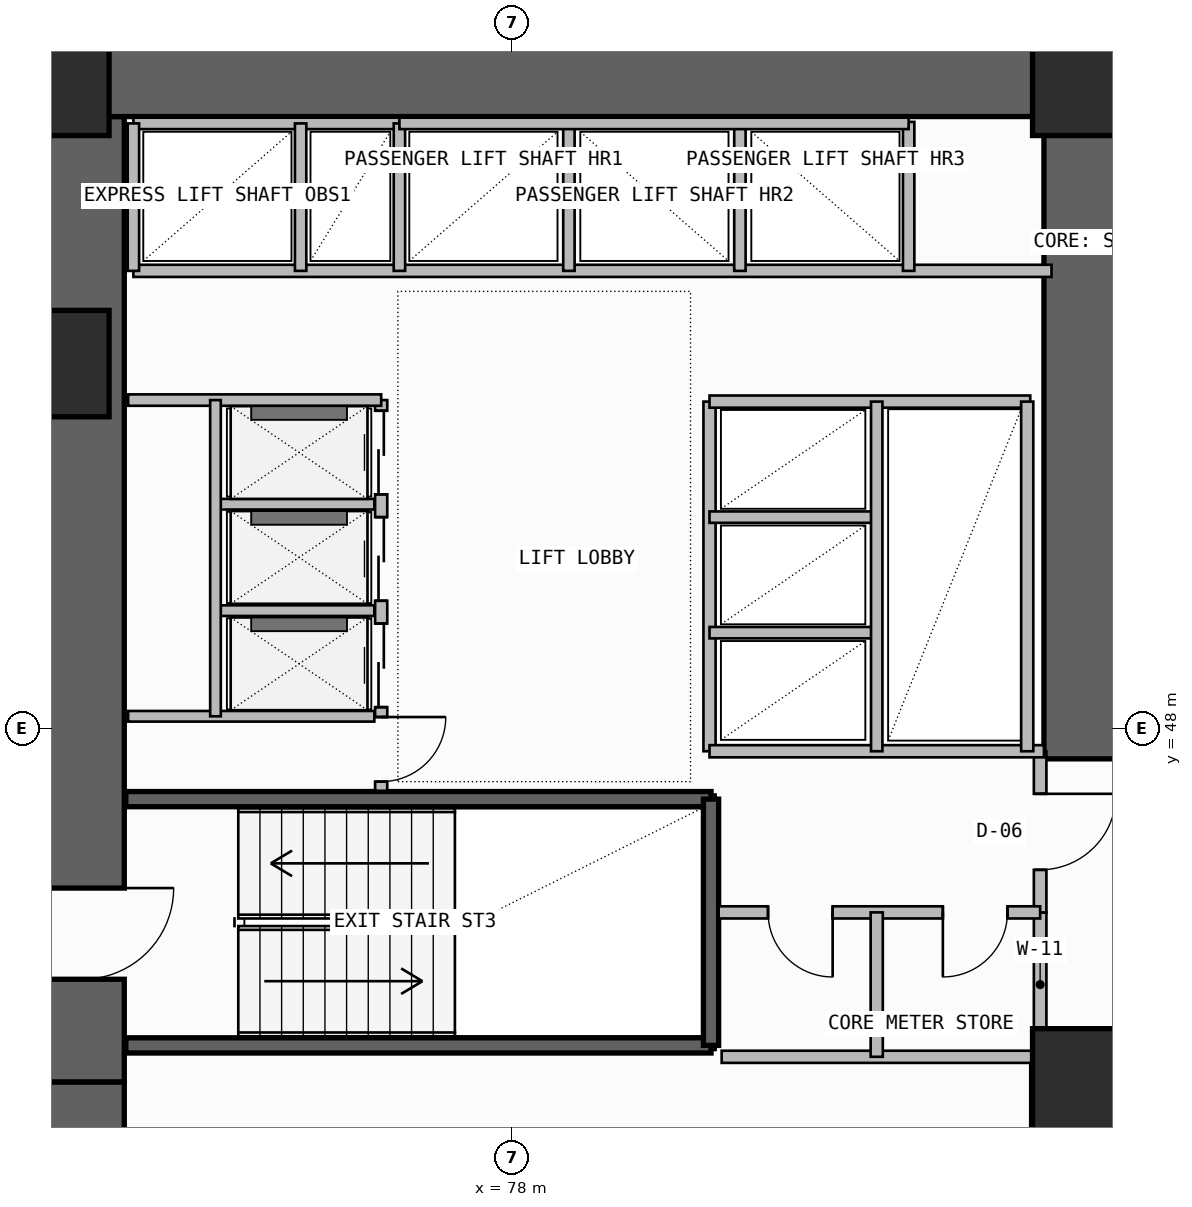
"""IFC4 building model, lengths in metres.
Left out: names, types, materials, properties, quantities, classifications, styles, units other than length and angle.
Written with IfcOpenShell. Run it as: python <this file> out.ifc"""

import sys

from ifc_helpers import new_model, si_unit, direction, frame, frame_2d, origin, origin_2d, place, context, subcontext, project, spatial, rectangle, extrude, element, fill, save


model = new_model("IFC4")
c1 = context("Model", 3, precision=1e-05, world=origin(), true_north=direction((0.0, 1.0)))
c2 = subcontext(c1, "Body", "Model", "MODEL_VIEW")
j1 = project(units=[si_unit("LENGTHUNIT", "METRE"), si_unit("PLANEANGLEUNIT", "RADIAN")], contexts=[c1])
p1 = place(None, origin())
s1 = spatial("IfcSite", under=j1, at=p1, CompositionType="ELEMENT")
p2 = place(p1, origin())
s2 = spatial("IfcBuilding", under=s1, at=p2, CompositionType="ELEMENT")
p3 = place(p2, frame((0.0, 0.0, 66.9)))
s3 = spatial("IfcBuildingStorey", under=s2, at=p3, CompositionType="ELEMENT", Elevation=66.9)
p4 = place(p3, frame((72.35, 35.5, -0.26), z_axis=(0.0, 0.0, 1.0), x_axis=(0.0, 1.0, 0.0)))
e1 = element("IfcWall", 1, at=p4, inside=s3, PredefinedType="SHEAR", context=c2, shape_type="SweptSolid", body=[
    extrude(rectangle(XDim=7.85, YDim=1.1, at=frame_2d((3.925, 0.0))), origin(), (0.0, 0.0, 1.0), 3.6),
])
p5 = place(p4, frame((1.45, 0.0, 0.26)))
e2 = element("IfcOpeningElement", 2, at=p5, cuts=e1, PredefinedType="OPENING", context=c2, shape_type="SweptSolid", body=[
    extrude(rectangle(XDim=1.2, YDim=2.2, at=frame_2d((0.6, 1.1))), frame((0.0, 0.56, 0.0), z_axis=(0.0, -1.0, 0.0), x_axis=(1.0, 0.0, 0.0)), (0.0, 0.0, 1.0), 1.12),
])
p6 = place(p3, frame((72.35, 43.35, -0.26), z_axis=(0.0, 0.0, 1.0), x_axis=(0.0, 1.0, 0.0)))
e3 = element("IfcWall", 3, at=p6, inside=s3, PredefinedType="SHEAR", context=c2, shape_type="SweptSolid", body=[
    extrude(rectangle(XDim=12.7, YDim=1.1, at=frame_2d((6.35, 0.0))), origin(), (0.0, 0.0, 1.0), 3.6),
])
p7 = place(p6, frame((1.35, 0.0, 0.26)))
e4 = element("IfcOpeningElement", 4, at=p7, cuts=e3, PredefinedType="OPENING", context=c2, shape_type="SweptSolid", body=[
    extrude(rectangle(XDim=1.2, YDim=2.2, at=frame_2d((0.6, 1.1))), frame((0.0, 0.56, 0.0), z_axis=(0.0, -1.0, 0.0), x_axis=(1.0, 0.0, 0.0)), (0.0, 0.0, 1.0), 1.12),
])
p8 = place(p3, frame((71.8, 56.6, -0.26), z_axis=(0.0, 0.0, 1.0), x_axis=(1.0, 0.0, 0.0)))
e5 = element("IfcWall", 5, at=p8, inside=s3, PredefinedType="SHEAR", context=c2, shape_type="SweptSolid", body=[
    extrude(rectangle(XDim=14.3, YDim=1.1, at=frame_2d((7.15, 0.0))), origin(), (0.0, 0.0, 1.0), 3.6),
])
p9 = place(p3, frame((85.55, 47.6, -0.26), z_axis=(0.0, 0.0, 1.0), x_axis=(0.0, 1.0, 0.0)))
e6 = element("IfcWall", 6, at=p9, inside=s3, PredefinedType="SHEAR", context=c2, shape_type="SweptSolid", body=[
    extrude(rectangle(XDim=8.45, YDim=1.1, at=frame_2d((4.225, 0.0))), origin(), (0.0, 0.0, 1.0), 3.6),
])
for number, where, z_axis, x_axis in (
    (7, (85.55, 43.35, 0.0), (0.0, 0.0, 1.0), (1.0, 0.0, 0.0)),
    (8, (72.0, 52.8, 0.0), (0.0, 0.0, 1.0), (1.0, 0.0, 0.0)),
    (9, (72.0, 56.5, 0.0), (0.0, 0.0, 1.0), (1.0, 0.0, 0.0)),
    (10, (85.55, 56.5, 0.0), (0.0, 0.0, 1.0), (1.0, 0.0, 0.0)),
):
    element("IfcColumn", number, at=place(p3, frame(where, z_axis=z_axis, x_axis=x_axis)), inside=s3, PredefinedType="COLUMN", context=c2, shape_type="SweptSolid", body=[
        extrude(rectangle(XDim=1.4, YDim=1.4, at=origin_2d()), origin(), (0.0, 0.0, 1.0), 3.6),
    ])
p10 = place(p3, frame((84.92, 38.85, 0.0), z_axis=(0.0, 0.0, 1.0), x_axis=(0.0, 1.0, 0.0)))
e11 = element("IfcWall", 11, at=p10, inside=s3, PredefinedType="SOLIDWALL", context=c2, shape_type="SweptSolid", body=[
    extrude(rectangle(XDim=4.83, YDim=0.2, at=frame_2d((2.415, 0.0))), origin(), (0.0, 0.0, 1.0), 3.34),
])
p11 = place(p10, frame((1.25, 0.0, 0.0)))
e12 = element("IfcOpeningElement", 12, at=p11, cuts=e11, PredefinedType="OPENING", context=c2, shape_type="SweptSolid", body=[
    extrude(rectangle(XDim=1.1, YDim=2.2, at=frame_2d((0.55, 1.1))), frame((0.0, 0.11, 0.0), z_axis=(0.0, -1.0, 0.0), x_axis=(1.0, 0.0, 0.0)), (0.0, 0.0, 1.0), 0.22),
])
for number, where, z_axis, x_axis in (
    (13, (72.92, 43.83, -0.26), (0.0, 0.0, 1.0), (1.0, 0.0, 0.0)),
    (14, (72.92, 47.07, -0.26), (0.0, 0.0, 1.0), (1.0, 0.0, 0.0)),
):
    element("IfcWall", number, at=place(p3, frame(where, z_axis=z_axis, x_axis=x_axis)), inside=s3, PredefinedType="SOLIDWALL", context=c2, shape_type="SweptSolid", body=[
        extrude(rectangle(XDim=7.7, YDim=0.2, at=frame_2d((3.85, 0.0))), origin(), (0.0, 0.0, 1.0), 3.6),
    ])
p12 = place(p3, frame((80.62, 43.83, -0.26), z_axis=(0.0, 0.0, 1.0), x_axis=(0.0, 1.0, 0.0)))
e15 = element("IfcWall", 15, at=p12, inside=s3, PredefinedType="SOLIDWALL", context=c2, shape_type="SweptSolid", body=[
    extrude(rectangle(XDim=3.24, YDim=0.2, at=frame_2d((1.62, 0.0))), origin(), (0.0, 0.0, 1.0), 3.6),
])
p13 = place(p3, frame((84.95, 43.68, 0.0), z_axis=(0.0, 0.0, 1.0), x_axis=(0.0, 1.0, 0.0)))
e16 = element("IfcWall", 16, at=p13, inside=s3, PredefinedType="PLUMBINGWALL", context=c2, shape_type="SweptSolid", body=[
    extrude(rectangle(XDim=1.9, YDim=0.165, at=frame_2d((0.95, 0.0))), origin(), (0.0, 0.0, 1.0), 3.34),
])
p14 = place(p3, frame((84.95, 45.58, 0.0), z_axis=(0.0, 0.0, 1.0), x_axis=(0.0, 1.0, 0.0)))
e17 = element("IfcWall", 17, at=p14, inside=s3, PredefinedType="PARTITIONING", context=c2, shape_type="SweptSolid", body=[
    extrude(rectangle(XDim=2.12, YDim=0.165, at=frame_2d((1.06, 0.0))), origin(), (0.0, 0.0, 1.0), 3.34),
])
p15 = place(p14, frame((0.56, 0.0, 0.0)))
e18 = element("IfcOpeningElement", 18, at=p15, cuts=e17, PredefinedType="OPENING", context=c2, shape_type="SweptSolid", body=[
    extrude(rectangle(XDim=1.0, YDim=2.2, at=frame_2d((0.5, 1.1))), frame((0.0, 0.093, 0.0), z_axis=(0.0, -1.0, 0.0), x_axis=(1.0, 0.0, 0.0)), (0.0, 0.0, 1.0), 0.185),
])
p16 = place(p3, frame((80.72, 45.58, 0.0), z_axis=(0.0, 0.0, 1.0), x_axis=(1.0, 0.0, 0.0)))
e19 = element("IfcWall", 19, at=p16, inside=s3, PredefinedType="PLUMBINGWALL", context=c2, shape_type="SweptSolid", body=[
    extrude(rectangle(XDim=4.23, YDim=0.16, at=frame_2d((2.115, 0.0))), origin(), (0.0, 0.0, 1.0), 3.34),
])
p17 = place(p16, frame((0.65, 0.0, 0.0)))
e20 = element("IfcOpeningElement", 20, at=p17, cuts=e19, PredefinedType="OPENING", context=c2, shape_type="SweptSolid", body=[
    extrude(rectangle(XDim=0.85, YDim=2.05, at=frame_2d((0.425, 1.025))), frame((0.0, 0.09, 0.0), z_axis=(0.0, -1.0, 0.0), x_axis=(1.0, 0.0, 0.0)), (0.0, 0.0, 1.0), 0.18),
])
p18 = place(p16, frame((2.95, 0.0, 0.0)))
e21 = element("IfcOpeningElement", 21, at=p18, cuts=e19, PredefinedType="OPENING", context=c2, shape_type="SweptSolid", body=[
    extrude(rectangle(XDim=0.85, YDim=2.05, at=frame_2d((0.425, 1.025))), frame((0.0, 0.09, 0.0), z_axis=(0.0, -1.0, 0.0), x_axis=(1.0, 0.0, 0.0)), (0.0, 0.0, 1.0), 0.18),
])
p19 = place(p3, frame((80.76, 43.68, 0.0), z_axis=(0.0, 0.0, 1.0), x_axis=(1.0, 0.0, 0.0)))
e22 = element("IfcWall", 22, at=p19, inside=s3, PredefinedType="PLUMBINGWALL", context=c2, shape_type="SweptSolid", body=[
    extrude(rectangle(XDim=4.19, YDim=0.16, at=frame_2d((2.095, 0.0))), origin(), (0.0, 0.0, 1.0), 3.34),
])
p20 = place(p3, frame((82.8, 43.68, 0.0), z_axis=(0.0, 0.0, 1.0), x_axis=(0.0, 1.0, 0.0)))
e23 = element("IfcWall", 23, at=p20, inside=s3, PredefinedType="PLUMBINGWALL", context=c2, shape_type="SweptSolid", body=[
    extrude(rectangle(XDim=1.9, YDim=0.16, at=frame_2d((0.95, 0.0))), origin(), (0.0, 0.0, 1.0), 3.34),
])
p21 = place(p3, frame((76.28, 47.18, 0.0), z_axis=(0.0, 0.0, 1.0), x_axis=(0.0, 1.0, 0.0)))
e24 = element("IfcWall", 24, at=p21, inside=s3, PredefinedType="SOLIDWALL", context=c2, shape_type="SweptSolid", body=[
    extrude(rectangle(XDim=5.14, YDim=0.16, at=frame_2d((2.57, 0.0))), origin(), (0.0, 0.0, 1.0), 3.34),
])
p22 = place(p21, frame((1.1, 0.0, 0.0)))
e25 = element("IfcOpeningElement", 25, at=p22, cuts=e24, PredefinedType="OPENING", context=c2, shape_type="SweptSolid", body=[
    extrude(rectangle(XDim=1.1, YDim=2.25, at=frame_2d((0.55, 1.125))), frame((0.0, 0.09, 0.0), z_axis=(0.0, -1.0, 0.0), x_axis=(1.0, 0.0, 0.0)), (0.0, 0.0, 1.0), 0.18),
])
p23 = place(p21, frame((2.5, 0.0, 0.0)))
e26 = element("IfcOpeningElement", 26, at=p23, cuts=e24, PredefinedType="OPENING", context=c2, shape_type="SweptSolid", body=[
    extrude(rectangle(XDim=1.1, YDim=2.25, at=frame_2d((0.55, 1.125))), frame((0.0, 0.09, 0.0), z_axis=(0.0, -1.0, 0.0), x_axis=(1.0, 0.0, 0.0)), (0.0, 0.0, 1.0), 0.18),
])
p24 = place(p21, frame((3.9, 0.0, 0.0)))
e27 = element("IfcOpeningElement", 27, at=p24, cuts=e24, PredefinedType="OPENING", context=c2, shape_type="SweptSolid", body=[
    extrude(rectangle(XDim=1.1, YDim=2.25, at=frame_2d((0.55, 1.125))), frame((0.0, 0.09, 0.0), z_axis=(0.0, -1.0, 0.0), x_axis=(1.0, 0.0, 0.0)), (0.0, 0.0, 1.0), 0.18),
])
p25 = place(p21, frame((0.12, 0.0, 0.0)))
e28 = element("IfcOpeningElement", 28, at=p25, cuts=e24, PredefinedType="OPENING", context=c2, shape_type="SweptSolid", body=[
    extrude(rectangle(XDim=0.85, YDim=2.05, at=frame_2d((0.425, 1.025))), frame((0.0, 0.09, 0.0), z_axis=(0.0, -1.0, 0.0), x_axis=(1.0, 0.0, 0.0)), (0.0, 0.0, 1.0), 0.18),
])
p26 = place(p3, frame((72.95, 52.32, 0.0), z_axis=(0.0, 0.0, 1.0), x_axis=(1.0, 0.0, 0.0)))
e29 = element("IfcWall", 29, at=p26, inside=s3, PredefinedType="SOLIDWALL", context=c2, shape_type="SweptSolid", body=[
    extrude(rectangle(XDim=3.33, YDim=0.15, at=frame_2d((1.665, 0.0))), origin(), (0.0, 0.0, 1.0), 3.34),
])
p27 = place(p3, frame((72.95, 48.16, 0.0), z_axis=(0.0, 0.0, 1.0), x_axis=(1.0, 0.0, 0.0)))
e30 = element("IfcWall", 30, at=p27, inside=s3, PredefinedType="PLUMBINGWALL", context=c2, shape_type="SweptSolid", body=[
    extrude(rectangle(XDim=3.24, YDim=0.14, at=frame_2d((1.62, 0.0))), origin(), (0.0, 0.0, 1.0), 3.34),
])
for number, where, z_axis, x_axis in (
    (31, (74.15, 49.55, 0.0), (0.0, 0.0, 1.0), (1.0, 0.0, 0.0)),
    (32, (74.15, 50.95, 0.0), (0.0, 0.0, 1.0), (1.0, 0.0, 0.0)),
):
    element("IfcWall", number, at=place(p3, frame(where, z_axis=z_axis, x_axis=x_axis)), inside=s3, PredefinedType="PLUMBINGWALL", context=c2, shape_type="SweptSolid", body=[
        extrude(rectangle(XDim=2.04, YDim=0.14, at=frame_2d((1.02, 0.0))), origin(), (0.0, 0.0, 1.0), 3.34),
    ])
p28 = place(p3, frame((74.1, 48.16, 0.0), z_axis=(0.0, 0.0, 1.0), x_axis=(0.0, 1.0, 0.0)))
e33 = element("IfcWall", 33, at=p28, inside=s3, PredefinedType="PLUMBINGWALL", context=c2, shape_type="SweptSolid", body=[
    extrude(rectangle(XDim=4.16, YDim=0.14, at=frame_2d((2.08, 0.0))), origin(), (0.0, 0.0, 1.0), 3.34),
])
p29 = place(p3, frame((80.6, 47.7, 0.0), z_axis=(0.0, 0.0, 1.0), x_axis=(0.0, 1.0, 0.0)))
e34 = element("IfcWall", 34, at=p29, inside=s3, PredefinedType="SOLIDWALL", context=c2, shape_type="SweptSolid", body=[
    extrude(rectangle(XDim=4.6, YDim=0.16, at=frame_2d((2.3, 0.0))), origin(), (0.0, 0.0, 1.0), 3.34),
])
p30 = place(p3, frame((80.6, 47.7, 0.0), z_axis=(0.0, 0.0, 1.0), x_axis=(1.0, 0.0, 0.0)))
e35 = element("IfcWall", 35, at=p30, inside=s3, PredefinedType="SOLIDWALL", context=c2, shape_type="SweptSolid", body=[
    extrude(rectangle(XDim=4.4, YDim=0.16, at=frame_2d((2.2, 0.0))), origin(), (0.0, 0.0, 1.0), 3.34),
])
p31 = place(p3, frame((80.6, 52.3, 0.0), z_axis=(0.0, 0.0, 1.0), x_axis=(1.0, 0.0, 0.0)))
e36 = element("IfcWall", 36, at=p31, inside=s3, PredefinedType="SOLIDWALL", context=c2, shape_type="SweptSolid", body=[
    extrude(rectangle(XDim=4.22, YDim=0.16, at=frame_2d((2.11, 0.0))), origin(), (0.0, 0.0, 1.0), 3.34),
])
for number, where, z_axis, x_axis in (
    (37, (80.6, 49.26, 0.0), (0.0, 0.0, 1.0), (1.0, 0.0, 0.0)),
    (38, (80.6, 50.78, 0.0), (0.0, 0.0, 1.0), (1.0, 0.0, 0.0)),
):
    element("IfcWall", number, at=place(p3, frame(where, z_axis=z_axis, x_axis=x_axis)), inside=s3, PredefinedType="PLUMBINGWALL", context=c2, shape_type="SweptSolid", body=[
        extrude(rectangle(XDim=2.2, YDim=0.15, at=frame_2d((1.1, 0.0))), origin(), (0.0, 0.0, 1.0), 3.34),
    ])
p32 = place(p3, frame((82.8, 47.7, 0.0), z_axis=(0.0, 0.0, 1.0), x_axis=(0.0, 1.0, 0.0)))
e39 = element("IfcWall", 39, at=p32, inside=s3, PredefinedType="PLUMBINGWALL", context=c2, shape_type="SweptSolid", body=[
    extrude(rectangle(XDim=4.6, YDim=0.15, at=frame_2d((2.3, 0.0))), origin(), (0.0, 0.0, 1.0), 3.34),
])
p33 = place(p3, frame((84.78, 47.7, 0.0), z_axis=(0.0, 0.0, 1.0), x_axis=(0.0, 1.0, 0.0)))
e40 = element("IfcWall", 40, at=p33, inside=s3, PredefinedType="SOLIDWALL", context=c2, shape_type="SweptSolid", body=[
    extrude(rectangle(XDim=4.6, YDim=0.16, at=frame_2d((2.3, 0.0))), origin(), (0.0, 0.0, 1.0), 3.34),
])
p34 = place(p3, frame((73.02, 54.02, 0.0), z_axis=(0.0, 0.0, 1.0), x_axis=(1.0, 0.0, 0.0)))
e41 = element("IfcWall", 41, at=p34, inside=s3, PredefinedType="SOLIDWALL", context=c2, shape_type="SweptSolid", body=[
    extrude(rectangle(XDim=12.08, YDim=0.16, at=frame_2d((6.04, 0.0))), origin(), (0.0, 0.0, 1.0), 3.34),
])
p35 = place(p3, frame((73.02, 55.96, 0.0), z_axis=(0.0, 0.0, 1.0), x_axis=(1.0, 0.0, 0.0)))
e42 = element("IfcWall", 42, at=p35, inside=s3, PredefinedType="SOLIDWALL", context=c2, shape_type="SweptSolid", body=[
    extrude(rectangle(XDim=3.5, YDim=0.15, at=frame_2d((1.75, 0.0))), origin(), (0.0, 0.0, 1.0), 3.34),
])
p36 = place(p3, frame((73.02, 54.02, 0.0), z_axis=(0.0, 0.0, 1.0), x_axis=(0.0, 1.0, 0.0)))
e43 = element("IfcWall", 43, at=p36, inside=s3, PredefinedType="PLUMBINGWALL", context=c2, shape_type="SweptSolid", body=[
    extrude(rectangle(XDim=1.94, YDim=0.15, at=frame_2d((0.97, 0.0))), origin(), (0.0, 0.0, 1.0), 3.34),
])
p37 = place(p3, frame((76.52, 54.02, 0.0), z_axis=(0.0, 0.0, 1.0), x_axis=(0.0, 1.0, 0.0)))
e44 = element("IfcWall", 44, at=p37, inside=s3, PredefinedType="SOLIDWALL", context=c2, shape_type="SweptSolid", body=[
    extrude(rectangle(XDim=1.94, YDim=0.15, at=frame_2d((0.97, 0.0))), origin(), (0.0, 0.0, 1.0), 3.34),
])
p38 = place(p3, frame((75.22, 54.02, 0.0), z_axis=(0.0, 0.0, 1.0), x_axis=(0.0, 1.0, 0.0)))
e45 = element("IfcWall", 45, at=p38, inside=s3, PredefinedType="PLUMBINGWALL", context=c2, shape_type="SweptSolid", body=[
    extrude(rectangle(XDim=1.94, YDim=0.15, at=frame_2d((0.97, 0.0))), origin(), (0.0, 0.0, 1.0), 3.34),
])
for number, where, z_axis, x_axis in (
    (46, (78.75, 54.02, 0.0), (0.0, 0.0, 1.0), (0.0, 1.0, 0.0)),
    (47, (81.0, 54.02, 0.0), (0.0, 0.0, 1.0), (0.0, 1.0, 0.0)),
):
    element("IfcWall", number, at=place(p3, frame(where, z_axis=z_axis, x_axis=x_axis)), inside=s3, PredefinedType="PLUMBINGWALL", context=c2, shape_type="SweptSolid", body=[
        extrude(rectangle(XDim=1.96, YDim=0.15, at=frame_2d((0.98, 0.0))), origin(), (0.0, 0.0, 1.0), 3.34),
    ])
p39 = place(p3, frame((83.22, 54.02, 0.0), z_axis=(0.0, 0.0, 1.0), x_axis=(0.0, 1.0, 0.0)))
e48 = element("IfcWall", 48, at=p39, inside=s3, PredefinedType="SOLIDWALL", context=c2, shape_type="SweptSolid", body=[
    extrude(rectangle(XDim=1.96, YDim=0.15, at=frame_2d((0.98, 0.0))), origin(), (0.0, 0.0, 1.0), 3.34),
])
p40 = place(p3, frame((76.52, 55.96, 0.0), z_axis=(0.0, 0.0, 1.0), x_axis=(1.0, 0.0, 0.0)))
e49 = element("IfcWall", 49, at=p40, inside=s3, PredefinedType="SOLIDWALL", context=c2, shape_type="SweptSolid", body=[
    extrude(rectangle(XDim=6.7, YDim=0.15, at=frame_2d((3.35, 0.0))), origin(), (0.0, 0.0, 1.0), 3.34),
])
p41 = place(p7, frame((1.2, 0.0, 0.0), z_axis=(0.0, 0.0, 1.0), x_axis=(-1.0, 0.0, 0.0)))
e50 = element("IfcDoor", 50, at=p41, inside=s3, OperationType="SINGLE_SWING_LEFT", PredefinedType="USERDEFINED", context=c2, shape_type="SweptSolid", body=[
    extrude(rectangle(XDim=1.2, YDim=2.2, at=frame_2d((0.6, 1.1))), frame((0.0, 0.025, 0.0), z_axis=(0.0, -1.0, 0.0), x_axis=(1.0, 0.0, 0.0)), (0.0, 0.0, 1.0), 0.05),
])
fill(e4, e50)
p42 = place(p15, frame((1.0, 0.0, 0.0), z_axis=(0.0, 0.0, 1.0), x_axis=(-1.0, 0.0, 0.0)))
e51 = element("IfcDoor", 51, at=p42, inside=s3, OperationType="SINGLE_SWING_LEFT", PredefinedType="DOOR", context=c2, shape_type="SweptSolid", body=[
    extrude(rectangle(XDim=1.0, YDim=2.2, at=frame_2d((0.5, 1.1))), frame((0.0, 0.025, 0.0), z_axis=(0.0, -1.0, 0.0), x_axis=(1.0, 0.0, 0.0)), (0.0, 0.0, 1.0), 0.05),
])
fill(e18, e51)
p43 = place(p17, frame((0.85, 0.0, 0.0), z_axis=(0.0, 0.0, 1.0), x_axis=(-1.0, 0.0, 0.0)))
e52 = element("IfcDoor", 52, at=p43, inside=s3, OperationType="SINGLE_SWING_LEFT", PredefinedType="DOOR", context=c2, shape_type="SweptSolid", body=[
    extrude(rectangle(XDim=0.85, YDim=2.05, at=frame_2d((0.425, 1.025))), frame((0.0, 0.025, 0.0), z_axis=(0.0, -1.0, 0.0), x_axis=(1.0, 0.0, 0.0)), (0.0, 0.0, 1.0), 0.05),
])
fill(e20, e52)
p44 = place(p18, frame((0.85, 0.0, 0.0), z_axis=(0.0, 0.0, 1.0), x_axis=(-1.0, 0.0, 0.0)))
e53 = element("IfcDoor", 53, at=p44, inside=s3, OperationType="SINGLE_SWING_RIGHT", PredefinedType="DOOR", context=c2, shape_type="SweptSolid", body=[
    extrude(rectangle(XDim=0.85, YDim=2.05, at=frame_2d((0.425, 1.025))), frame((0.0, 0.025, 0.0), z_axis=(0.0, -1.0, 0.0), x_axis=(1.0, 0.0, 0.0)), (0.0, 0.0, 1.0), 0.05),
])
fill(e21, e53)
p45 = place(p22, origin())
e54 = element("IfcDoor", 54, at=p45, inside=s3, OperationType="DOUBLE_DOOR_SLIDING", PredefinedType="DOOR", context=c2, shape_type="SweptSolid", body=[
    extrude(rectangle(XDim=1.1, YDim=2.25, at=frame_2d((0.55, 1.125))), frame((0.0, 0.025, 0.0), z_axis=(0.0, -1.0, 0.0), x_axis=(1.0, 0.0, 0.0)), (0.0, 0.0, 1.0), 0.05),
])
fill(e25, e54)
p46 = place(p23, origin())
e55 = element("IfcDoor", 55, at=p46, inside=s3, OperationType="DOUBLE_DOOR_SLIDING", PredefinedType="DOOR", context=c2, shape_type="SweptSolid", body=[
    extrude(rectangle(XDim=1.1, YDim=2.25, at=frame_2d((0.55, 1.125))), frame((0.0, 0.025, 0.0), z_axis=(0.0, -1.0, 0.0), x_axis=(1.0, 0.0, 0.0)), (0.0, 0.0, 1.0), 0.05),
])
fill(e26, e55)
p47 = place(p24, origin())
e56 = element("IfcDoor", 56, at=p47, inside=s3, OperationType="DOUBLE_DOOR_SLIDING", PredefinedType="DOOR", context=c2, shape_type="SweptSolid", body=[
    extrude(rectangle(XDim=1.1, YDim=2.25, at=frame_2d((0.55, 1.125))), frame((0.0, 0.025, 0.0), z_axis=(0.0, -1.0, 0.0), x_axis=(1.0, 0.0, 0.0)), (0.0, 0.0, 1.0), 0.05),
])
fill(e27, e56)
p48 = place(p25, frame((0.85, 0.0, 0.0), z_axis=(0.0, 0.0, 1.0), x_axis=(-1.0, 0.0, 0.0)))
e57 = element("IfcDoor", 57, at=p48, inside=s3, OperationType="SINGLE_SWING_LEFT", PredefinedType="DOOR", context=c2, shape_type="SweptSolid", body=[
    extrude(rectangle(XDim=0.85, YDim=2.05, at=frame_2d((0.425, 1.025))), frame((0.0, 0.025, 0.0), z_axis=(0.0, -1.0, 0.0), x_axis=(1.0, 0.0, 0.0)), (0.0, 0.0, 1.0), 0.05),
])
fill(e28, e57)
save(model, sys.argv[1])
